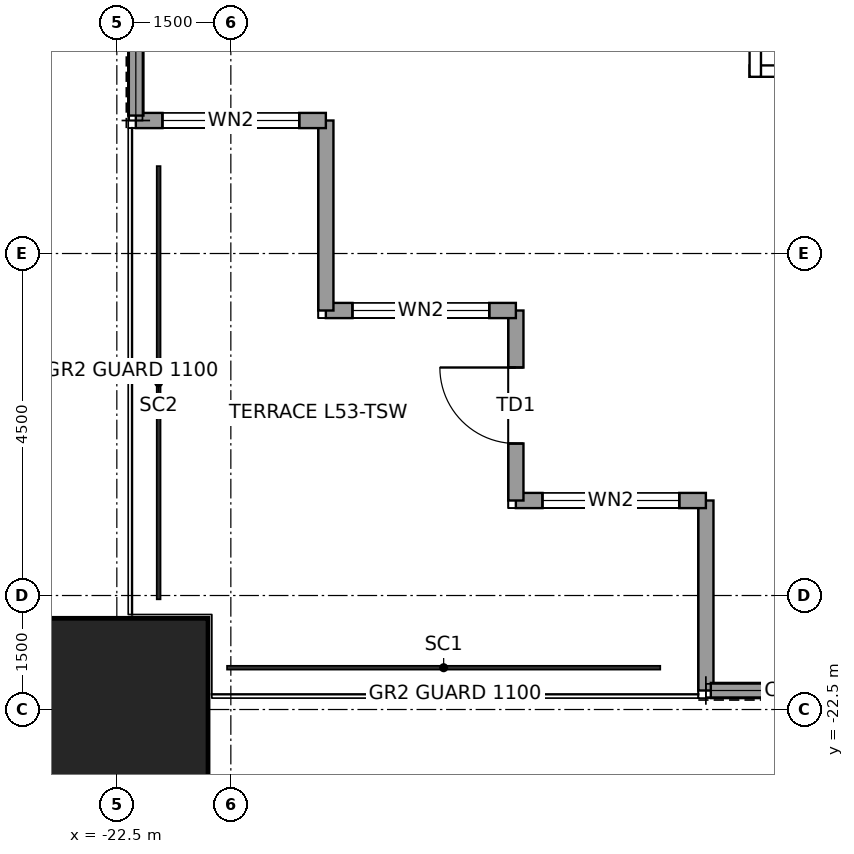
"""IFC4 building model, lengths in metres.
Left out: names, types, materials, properties, quantities, classifications, styles, units other than length and angle.
Written with IfcOpenShell. Run it as: python <this file> out.ifc"""

import sys

from ifc_helpers import new_model, si_unit, direction, frame, frame_2d, origin, origin_2d, place, context, subcontext, project, spatial, rectangle, hollow_rectangle, extrude, element, fill, save


model = new_model("IFC4")
c1 = context("Model", 3, precision=1e-05, world=origin(), true_north=direction((0.0, 1.0)))
c2 = subcontext(c1, "Body", "Model", "MODEL_VIEW")
j1 = project(units=[si_unit("LENGTHUNIT", "METRE"), si_unit("PLANEANGLEUNIT", "RADIAN")], contexts=[c1])
p1 = place(None, origin())
s1 = spatial("IfcSite", under=j1, at=p1, CompositionType="ELEMENT")
p2 = place(p1, origin())
s2 = spatial("IfcBuilding", under=s1, at=p2, CompositionType="ELEMENT")
p3 = place(p2, frame((0.0, 0.0, 245.9)))
s3 = spatial("IfcBuildingStorey", under=s2, at=p3, CompositionType="ELEMENT", Elevation=245.9)
p4 = place(p3, frame((-22.5, -22.5, 0.0), z_axis=(0.0, 0.0, 1.0), x_axis=(1.0, 0.0, 0.0)))
e1 = element("IfcColumn", 1, at=p4, inside=s3, PredefinedType="COLUMN", context=c2, shape_type="SweptSolid", body=[
    extrude(hollow_rectangle(XDim=2.4, YDim=2.4, WallThickness=0.12, at=origin_2d()), origin(), (0.0, 0.0, 1.0), 4.0),
])
p5 = place(p3, frame((-14.75, -22.25, 0.0), z_axis=(0.0, 0.0, 1.0), x_axis=(0.0, 1.0, 0.0)))
e2 = element("IfcWall", 2, at=p5, inside=s3, PredefinedType="SOLIDWALL", context=c2, shape_type="SweptSolid", body=[
    extrude(rectangle(XDim=2.5, YDim=0.2, at=frame_2d((1.25, 0.0))), origin(), (0.0, 0.0, 1.0), 3.85),
])
p6 = place(p3, frame((-14.75, -19.75, 0.0), z_axis=(0.0, 0.0, 1.0), x_axis=(-1.0, 0.0, 0.0)))
e3 = element("IfcWall", 3, at=p6, inside=s3, PredefinedType="SOLIDWALL", context=c2, shape_type="SweptSolid", body=[
    extrude(rectangle(XDim=2.5, YDim=0.2, at=frame_2d((1.25, 0.0))), origin(), (0.0, 0.0, 1.0), 3.85),
])
p7 = place(p6, frame((0.35, 0.0, 0.3)))
e4 = element("IfcOpeningElement", 4, at=p7, cuts=e3, PredefinedType="OPENING", context=c2, shape_type="SweptSolid", body=[
    extrude(rectangle(XDim=1.8, YDim=2.4, at=frame_2d((0.9, 1.2))), frame((0.0, 0.11, 0.0), z_axis=(0.0, -1.0, 0.0), x_axis=(1.0, 0.0, 0.0)), (0.0, 0.0, 1.0), 0.22),
])
p8 = place(p3, frame((-17.25, -19.75, 0.0), z_axis=(0.0, 0.0, 1.0), x_axis=(0.0, 1.0, 0.0)))
e5 = element("IfcWall", 5, at=p8, inside=s3, PredefinedType="SOLIDWALL", context=c2, shape_type="SweptSolid", body=[
    extrude(rectangle(XDim=2.5, YDim=0.2, at=frame_2d((1.25, 0.0))), origin(), (0.0, 0.0, 1.0), 3.85),
])
p9 = place(p8, frame((0.75, 0.0, 0.0)))
e6 = element("IfcOpeningElement", 6, at=p9, cuts=e5, PredefinedType="OPENING", context=c2, shape_type="SweptSolid", body=[
    extrude(rectangle(XDim=1.0, YDim=2.4, at=frame_2d((0.5, 1.2))), frame((0.0, 0.11, 0.0), z_axis=(0.0, -1.0, 0.0), x_axis=(1.0, 0.0, 0.0)), (0.0, 0.0, 1.0), 0.22),
])
p10 = place(p3, frame((-17.25, -17.25, 0.0), z_axis=(0.0, 0.0, 1.0), x_axis=(-1.0, 0.0, 0.0)))
e7 = element("IfcWall", 7, at=p10, inside=s3, PredefinedType="SOLIDWALL", context=c2, shape_type="SweptSolid", body=[
    extrude(rectangle(XDim=2.5, YDim=0.2, at=frame_2d((1.25, 0.0))), origin(), (0.0, 0.0, 1.0), 3.85),
])
p11 = place(p10, frame((0.35, 0.0, 0.3)))
e8 = element("IfcOpeningElement", 8, at=p11, cuts=e7, PredefinedType="OPENING", context=c2, shape_type="SweptSolid", body=[
    extrude(rectangle(XDim=1.8, YDim=2.4, at=frame_2d((0.9, 1.2))), frame((0.0, 0.11, 0.0), z_axis=(0.0, -1.0, 0.0), x_axis=(1.0, 0.0, 0.0)), (0.0, 0.0, 1.0), 0.22),
])
p12 = place(p3, frame((-19.75, -17.25, 0.0), z_axis=(0.0, 0.0, 1.0), x_axis=(0.0, 1.0, 0.0)))
e9 = element("IfcWall", 9, at=p12, inside=s3, PredefinedType="SOLIDWALL", context=c2, shape_type="SweptSolid", body=[
    extrude(rectangle(XDim=2.5, YDim=0.2, at=frame_2d((1.25, 0.0))), origin(), (0.0, 0.0, 1.0), 3.85),
])
p13 = place(p3, frame((-19.75, -14.75, 0.0), z_axis=(0.0, 0.0, 1.0), x_axis=(-1.0, 0.0, 0.0)))
e10 = element("IfcWall", 10, at=p13, inside=s3, PredefinedType="SOLIDWALL", context=c2, shape_type="SweptSolid", body=[
    extrude(rectangle(XDim=2.5, YDim=0.2, at=frame_2d((1.25, 0.0))), origin(), (0.0, 0.0, 1.0), 3.85),
])
p14 = place(p13, frame((0.35, 0.0, 0.3)))
e11 = element("IfcOpeningElement", 11, at=p14, cuts=e10, PredefinedType="OPENING", context=c2, shape_type="SweptSolid", body=[
    extrude(rectangle(XDim=1.8, YDim=2.4, at=frame_2d((0.9, 1.2))), frame((0.0, 0.11, 0.0), z_axis=(0.0, -1.0, 0.0), x_axis=(1.0, 0.0, 0.0)), (0.0, 0.0, 1.0), 0.22),
])
for number, where, z_axis, x_axis in (
    (12, (-12.398, -22.25, 0.0), (0.0, 0.0, 1.0), (-1.0, 0.0, 0.0)),
    (13, (-22.25, -14.685, 0.0), (0.0, 0.0, 1.0), (0.0, 1.0, 0.0)),
):
    element("IfcWall", number, at=place(p3, frame(where, z_axis=z_axis, x_axis=x_axis)), inside=s3, PredefinedType="SOLIDWALL", context=c2, shape_type="SweptSolid", body=[
        extrude(rectangle(XDim=2.287, YDim=0.2, at=frame_2d((1.144, 0.0))), origin(), (0.0, 0.0, 1.0), 3.85),
    ])
p15 = place(p3, frame((-14.175, -14.1, 0.0), z_axis=(0.0, 0.0, 1.0), x_axis=(1.0, 0.0, 0.0)))
e14 = element("IfcWall", 14, at=p15, inside=s3, PredefinedType="PARTITIONING", context=c2, shape_type="SweptSolid", body=[
    extrude(rectangle(XDim=4.333, YDim=0.15, at=frame_2d((2.167, 0.0))), origin(), (0.0, 0.0, 1.0), 3.85),
])
p16 = place(p3, frame((-14.1, -14.175, 0.0), z_axis=(0.0, 0.0, 1.0), x_axis=(0.0, 1.0, 0.0)))
e15 = element("IfcWall", 15, at=p16, inside=s3, PredefinedType="PARTITIONING", context=c2, shape_type="SweptSolid", body=[
    extrude(rectangle(XDim=26.25, YDim=0.15, at=frame_2d((13.125, 0.0))), origin(), (0.0, 0.0, 1.0), 3.85),
])
p17 = place(p16, frame((4.125, 0.0, 0.0)))
e16 = element("IfcOpeningElement", 16, at=p17, cuts=e15, PredefinedType="OPENING", context=c2, shape_type="SweptSolid", body=[
    extrude(rectangle(XDim=1.0, YDim=2.4, at=frame_2d((0.5, 1.2))), frame((0.0, 0.085, 0.0), z_axis=(0.0, -1.0, 0.0), x_axis=(1.0, 0.0, 0.0)), (0.0, 0.0, 1.0), 0.17),
])
p18 = place(p7, origin())
e17 = element("IfcWindow", 17, at=p18, inside=s3, PartitioningType="SINGLE_PANEL", PredefinedType="WINDOW", context=c2, shape_type="SweptSolid", body=[
    extrude(rectangle(XDim=1.8, YDim=2.4, at=frame_2d((0.9, 1.2))), frame((0.0, 0.03, 0.0), z_axis=(0.0, -1.0, 0.0), x_axis=(1.0, 0.0, 0.0)), (0.0, 0.0, 1.0), 0.06),
])
fill(e4, e17)
p19 = place(p9, origin())
e18 = element("IfcDoor", 18, at=p19, inside=s3, OperationType="SINGLE_SWING_RIGHT", PredefinedType="DOOR", context=c2, shape_type="SweptSolid", body=[
    extrude(rectangle(XDim=1.0, YDim=2.4, at=frame_2d((0.5, 1.2))), frame((0.0, 0.025, 0.0), z_axis=(0.0, -1.0, 0.0), x_axis=(1.0, 0.0, 0.0)), (0.0, 0.0, 1.0), 0.05),
])
fill(e6, e18)
p20 = place(p11, origin())
e19 = element("IfcWindow", 19, at=p20, inside=s3, PartitioningType="SINGLE_PANEL", PredefinedType="WINDOW", context=c2, shape_type="SweptSolid", body=[
    extrude(rectangle(XDim=1.8, YDim=2.4, at=frame_2d((0.9, 1.2))), frame((0.0, 0.03, 0.0), z_axis=(0.0, -1.0, 0.0), x_axis=(1.0, 0.0, 0.0)), (0.0, 0.0, 1.0), 0.06),
])
fill(e8, e19)
p21 = place(p14, origin())
e20 = element("IfcWindow", 20, at=p21, inside=s3, PartitioningType="SINGLE_PANEL", PredefinedType="WINDOW", context=c2, shape_type="SweptSolid", body=[
    extrude(rectangle(XDim=1.8, YDim=2.4, at=frame_2d((0.9, 1.2))), frame((0.0, 0.03, 0.0), z_axis=(0.0, -1.0, 0.0), x_axis=(1.0, 0.0, 0.0)), (0.0, 0.0, 1.0), 0.06),
])
fill(e11, e20)
save(model, sys.argv[1])
